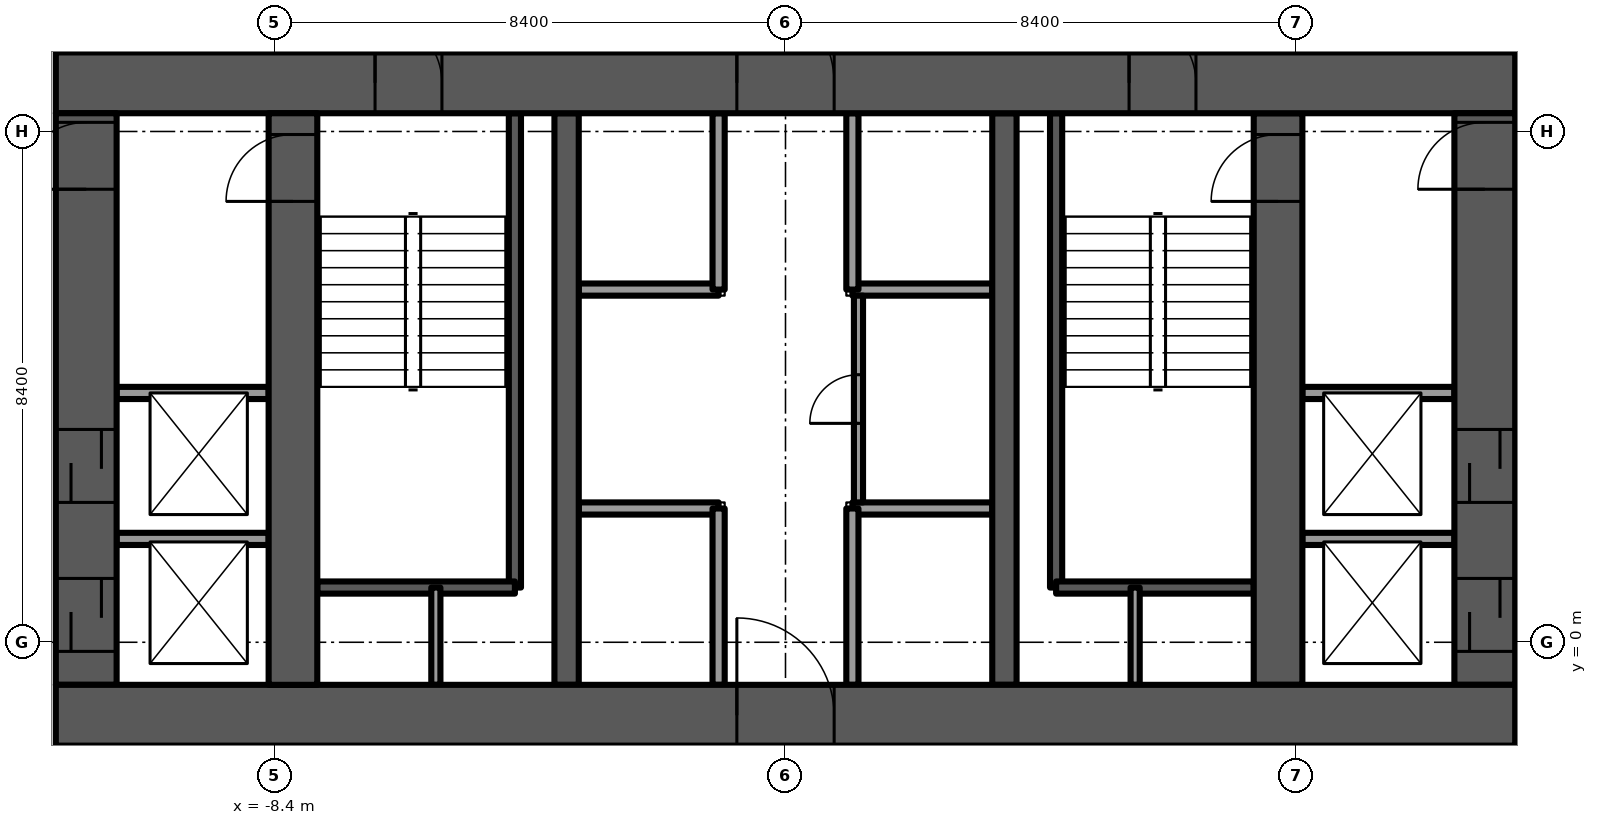
"""IFC4 building model, lengths in metres.
Left out: names, types, materials, properties, quantities, classifications, styles, units other than length and angle.
Written with IfcOpenShell. Run it as: python <this file> out.ifc"""

import sys

from ifc_helpers import new_model, si_unit, direction, frame, frame_2d, origin, place, context, subcontext, project, spatial, rectangle, extrude, element, fill, save


model = new_model("IFC4")
c1 = context("Model", 3, precision=1e-05, world=origin(), true_north=direction((0.0, 1.0)))
c2 = subcontext(c1, "Body", "Model", "MODEL_VIEW")
j1 = project(units=[si_unit("LENGTHUNIT", "METRE"), si_unit("PLANEANGLEUNIT", "RADIAN")], contexts=[c1])
p1 = place(None, origin())
s1 = spatial("IfcSite", under=j1, at=p1, CompositionType="ELEMENT")
p2 = place(p1, origin())
s2 = spatial("IfcBuilding", under=s1, at=p2, CompositionType="ELEMENT")
p3 = place(p2, frame((0.0, 0.0, 93.0)))
s3 = spatial("IfcBuildingStorey", under=s2, at=p3, CompositionType="ELEMENT", Elevation=93.0)
p4 = place(p3, frame((-12.0, -1.2, -0.3), z_axis=(0.0, 0.0, 1.0), x_axis=(1.0, 0.0, 0.0)))
e1 = element("IfcWall", 1, at=p4, inside=s3, PredefinedType="SHEAR", context=c2, shape_type="SweptSolid", body=[
    extrude(rectangle(XDim=24.0, YDim=1.0, at=frame_2d((12.0, 0.0))), origin(), (0.0, 0.0, 1.0), 3.75),
])
p5 = place(p4, frame((11.2, 0.0, 0.0)))
e2 = element("IfcOpeningElement", 2, at=p5, cuts=e1, PredefinedType="OPENING", context=c2, shape_type="SweptSolid", body=[
    extrude(rectangle(XDim=1.6, YDim=2.1, at=frame_2d((0.8, 1.05))), frame((0.0, 0.5, 0.0), z_axis=(0.0, -1.0, 0.0), x_axis=(1.0, 0.0, 0.0)), (0.0, 0.0, 1.0), 1.0),
])
p6 = place(p3, frame((-12.0, 9.2, -0.3), z_axis=(0.0, 0.0, 1.0), x_axis=(1.0, 0.0, 0.0)))
e3 = element("IfcWall", 3, at=p6, inside=s3, PredefinedType="SHEAR", context=c2, shape_type="SweptSolid", body=[
    extrude(rectangle(XDim=24.0, YDim=1.0, at=frame_2d((12.0, 0.0))), origin(), (0.0, 0.0, 1.0), 3.75),
])
p7 = place(p6, frame((11.2, 0.0, 0.0)))
e4 = element("IfcOpeningElement", 4, at=p7, cuts=e3, PredefinedType="OPENING", context=c2, shape_type="SweptSolid", body=[
    extrude(rectangle(XDim=1.6, YDim=2.1, at=frame_2d((0.8, 1.05))), frame((0.0, 0.5, 0.0), z_axis=(0.0, -1.0, 0.0), x_axis=(1.0, 0.0, 0.0)), (0.0, 0.0, 1.0), 1.0),
])
p8 = place(p6, frame((5.25, 0.0, 0.0)))
e5 = element("IfcOpeningElement", 5, at=p8, cuts=e3, PredefinedType="OPENING", context=c2, shape_type="SweptSolid", body=[
    extrude(rectangle(XDim=1.1, YDim=2.1, at=frame_2d((0.55, 1.05))), frame((0.0, 0.5, 0.0), z_axis=(0.0, -1.0, 0.0), x_axis=(1.0, 0.0, 0.0)), (0.0, 0.0, 1.0), 1.0),
])
p9 = place(p6, frame((17.65, 0.0, 0.0)))
e6 = element("IfcOpeningElement", 6, at=p9, cuts=e3, PredefinedType="OPENING", context=c2, shape_type="SweptSolid", body=[
    extrude(rectangle(XDim=1.1, YDim=2.1, at=frame_2d((0.55, 1.05))), frame((0.0, 0.5, 0.0), z_axis=(0.0, -1.0, 0.0), x_axis=(1.0, 0.0, 0.0)), (0.0, 0.0, 1.0), 1.0),
])
p10 = place(p3, frame((-8.1, -0.7, -0.3), z_axis=(0.0, 0.0, 1.0), x_axis=(0.0, 1.0, 0.0)))
e7 = element("IfcWall", 7, at=p10, inside=s3, PredefinedType="SHEAR", context=c2, shape_type="SweptSolid", body=[
    extrude(rectangle(XDim=9.4, YDim=0.8, at=frame_2d((4.7, 0.0))), origin(), (0.0, 0.0, 1.0), 3.75),
])
p11 = place(p10, frame((7.95, 0.0, 0.0)))
e8 = element("IfcOpeningElement", 8, at=p11, cuts=e7, PredefinedType="OPENING", context=c2, shape_type="SweptSolid", body=[
    extrude(rectangle(XDim=1.1, YDim=2.1, at=frame_2d((0.55, 1.05))), frame((0.0, 0.4, 0.0), z_axis=(0.0, -1.0, 0.0), x_axis=(1.0, 0.0, 0.0)), (0.0, 0.0, 1.0), 0.8),
])
p12 = place(p3, frame((8.1, -0.7, -0.3), z_axis=(0.0, 0.0, 1.0), x_axis=(0.0, 1.0, 0.0)))
e9 = element("IfcWall", 9, at=p12, inside=s3, PredefinedType="SHEAR", context=c2, shape_type="SweptSolid", body=[
    extrude(rectangle(XDim=9.4, YDim=0.8, at=frame_2d((4.7, 0.0))), origin(), (0.0, 0.0, 1.0), 3.75),
])
p13 = place(p12, frame((7.95, 0.0, 0.0)))
e10 = element("IfcOpeningElement", 10, at=p13, cuts=e9, PredefinedType="OPENING", context=c2, shape_type="SweptSolid", body=[
    extrude(rectangle(XDim=1.1, YDim=2.1, at=frame_2d((0.55, 1.05))), frame((0.0, 0.4, 0.0), z_axis=(0.0, -1.0, 0.0), x_axis=(1.0, 0.0, 0.0)), (0.0, 0.0, 1.0), 0.8),
])
for number, where, z_axis, x_axis in (
    (11, (-3.6, -0.7, -0.3), (0.0, 0.0, 1.0), (0.0, 1.0, 0.0)),
    (12, (3.6, -0.7, -0.3), (0.0, 0.0, 1.0), (0.0, 1.0, 0.0)),
):
    element("IfcWall", number, at=place(p3, frame(where, z_axis=z_axis, x_axis=x_axis)), inside=s3, PredefinedType="SHEAR", context=c2, shape_type="SweptSolid", body=[
        extrude(rectangle(XDim=9.4, YDim=0.4, at=frame_2d((4.7, 0.0))), origin(), (0.0, 0.0, 1.0), 3.75),
    ])
p14 = place(p3, frame((-11.5, -0.7, -0.3), z_axis=(0.0, 0.0, 1.0), x_axis=(0.0, 1.0, 0.0)))
e13 = element("IfcWall", 13, at=p14, inside=s3, PredefinedType="SHEAR", context=c2, shape_type="SweptSolid", body=[
    extrude(rectangle(XDim=9.4, YDim=1.0, at=frame_2d((4.7, 0.0))), origin(), (0.0, 0.0, 1.0), 3.75),
])
p15 = place(p14, frame((8.15, 0.0, 0.0)))
e14 = element("IfcOpeningElement", 14, at=p15, cuts=e13, PredefinedType="OPENING", context=c2, shape_type="SweptSolid", body=[
    extrude(rectangle(XDim=1.1, YDim=2.1, at=frame_2d((0.55, 1.05))), frame((0.0, 0.5, 0.0), z_axis=(0.0, -1.0, 0.0), x_axis=(1.0, 0.0, 0.0)), (0.0, 0.0, 1.0), 1.0),
])
p16 = place(p14, frame((0.55, 0.0, 0.0)))
e15 = element("IfcOpeningElement", 15, at=p16, cuts=e13, PredefinedType="OPENING", context=c2, shape_type="SweptSolid", body=[
    extrude(rectangle(XDim=1.2, YDim=2.1, at=frame_2d((0.6, 1.05))), frame((0.0, 0.5, 0.0), z_axis=(0.0, -1.0, 0.0), x_axis=(1.0, 0.0, 0.0)), (0.0, 0.0, 1.0), 1.0),
])
p17 = place(p14, frame((3.0, 0.0, 0.0)))
e16 = element("IfcOpeningElement", 16, at=p17, cuts=e13, PredefinedType="OPENING", context=c2, shape_type="SweptSolid", body=[
    extrude(rectangle(XDim=1.2, YDim=2.1, at=frame_2d((0.6, 1.05))), frame((0.0, 0.5, 0.0), z_axis=(0.0, -1.0, 0.0), x_axis=(1.0, 0.0, 0.0)), (0.0, 0.0, 1.0), 1.0),
])
p18 = place(p3, frame((11.5, -0.7, -0.3), z_axis=(0.0, 0.0, 1.0), x_axis=(0.0, 1.0, 0.0)))
e17 = element("IfcWall", 17, at=p18, inside=s3, PredefinedType="SHEAR", context=c2, shape_type="SweptSolid", body=[
    extrude(rectangle(XDim=9.4, YDim=1.0, at=frame_2d((4.7, 0.0))), origin(), (0.0, 0.0, 1.0), 3.75),
])
p19 = place(p18, frame((8.15, 0.0, 0.0)))
e18 = element("IfcOpeningElement", 18, at=p19, cuts=e17, PredefinedType="OPENING", context=c2, shape_type="SweptSolid", body=[
    extrude(rectangle(XDim=1.1, YDim=2.1, at=frame_2d((0.55, 1.05))), frame((0.0, 0.5, 0.0), z_axis=(0.0, -1.0, 0.0), x_axis=(1.0, 0.0, 0.0)), (0.0, 0.0, 1.0), 1.0),
])
p20 = place(p18, frame((0.55, 0.0, 0.0)))
e19 = element("IfcOpeningElement", 19, at=p20, cuts=e17, PredefinedType="OPENING", context=c2, shape_type="SweptSolid", body=[
    extrude(rectangle(XDim=1.2, YDim=2.1, at=frame_2d((0.6, 1.05))), frame((0.0, 0.5, 0.0), z_axis=(0.0, -1.0, 0.0), x_axis=(1.0, 0.0, 0.0)), (0.0, 0.0, 1.0), 1.0),
])
p21 = place(p18, frame((3.0, 0.0, 0.0)))
e20 = element("IfcOpeningElement", 20, at=p21, cuts=e17, PredefinedType="OPENING", context=c2, shape_type="SweptSolid", body=[
    extrude(rectangle(XDim=1.2, YDim=2.1, at=frame_2d((0.6, 1.05))), frame((0.0, 0.5, 0.0), z_axis=(0.0, -1.0, 0.0), x_axis=(1.0, 0.0, 0.0)), (0.0, 0.0, 1.0), 1.0),
])
for number, where, z_axis, x_axis in (
    (21, (-3.4, 2.2, 0.0), (0.0, 0.0, 1.0), (1.0, 0.0, 0.0)),
    (22, (-3.4, 5.8, 0.0), (0.0, 0.0, 1.0), (1.0, 0.0, 0.0)),
    (23, (1.1, 2.2, 0.0), (0.0, 0.0, 1.0), (1.0, 0.0, 0.0)),
    (24, (1.1, 5.8, 0.0), (0.0, 0.0, 1.0), (1.0, 0.0, 0.0)),
):
    element("IfcWall", number, at=place(p3, frame(where, z_axis=z_axis, x_axis=x_axis)), inside=s3, PredefinedType="PARTITIONING", context=c2, shape_type="SweptSolid", body=[
        extrude(rectangle(XDim=2.3, YDim=0.2, at=frame_2d((1.15, 0.0))), origin(), (0.0, 0.0, 1.0), 3.45),
    ])
for number, where, z_axis, x_axis in (
    (25, (-1.1, -0.7, 0.0), (0.0, 0.0, 1.0), (0.0, 1.0, 0.0)),
    (26, (1.1, -0.7, 0.0), (0.0, 0.0, 1.0), (0.0, 1.0, 0.0)),
    (27, (-1.1, 5.8, 0.0), (0.0, 0.0, 1.0), (0.0, 1.0, 0.0)),
    (28, (1.1, 5.8, 0.0), (0.0, 0.0, 1.0), (0.0, 1.0, 0.0)),
):
    element("IfcWall", number, at=place(p3, frame(where, z_axis=z_axis, x_axis=x_axis)), inside=s3, PredefinedType="PARTITIONING", context=c2, shape_type="SweptSolid", body=[
        extrude(rectangle(XDim=2.9, YDim=0.2, at=frame_2d((1.45, 0.0))), origin(), (0.0, 0.0, 1.0), 3.45),
    ])
p22 = place(p3, frame((-4.45, 0.9, -0.3), z_axis=(0.0, 0.0, 1.0), x_axis=(0.0, 1.0, 0.0)))
e29 = element("IfcWall", 29, at=p22, inside=s3, PredefinedType="SOLIDWALL", context=c2, shape_type="SweptSolid", body=[
    extrude(rectangle(XDim=7.8, YDim=0.2, at=frame_2d((3.9, 0.0))), origin(), (0.0, 0.0, 1.0), 3.75),
])
p23 = place(p3, frame((-7.7, 0.9, -0.3), z_axis=(0.0, 0.0, 1.0), x_axis=(1.0, 0.0, 0.0)))
e30 = element("IfcWall", 30, at=p23, inside=s3, PredefinedType="SOLIDWALL", context=c2, shape_type="SweptSolid", body=[
    extrude(rectangle(XDim=3.25, YDim=0.2, at=frame_2d((1.625, 0.0))), origin(), (0.0, 0.0, 1.0), 3.75),
])
p24 = place(p3, frame((-5.75, -0.7, 0.0), z_axis=(0.0, 0.0, 1.0), x_axis=(0.0, 1.0, 0.0)))
e31 = element("IfcWall", 31, at=p24, inside=s3, PredefinedType="PARTITIONING", context=c2, shape_type="SweptSolid", body=[
    extrude(rectangle(XDim=1.6, YDim=0.15, at=frame_2d((0.8, 0.0))), origin(), (0.0, 0.0, 1.0), 3.45),
])
p25 = place(p3, frame((4.45, 0.9, -0.3), z_axis=(0.0, 0.0, 1.0), x_axis=(0.0, 1.0, 0.0)))
e32 = element("IfcWall", 32, at=p25, inside=s3, PredefinedType="SOLIDWALL", context=c2, shape_type="SweptSolid", body=[
    extrude(rectangle(XDim=7.8, YDim=0.2, at=frame_2d((3.9, 0.0))), origin(), (0.0, 0.0, 1.0), 3.75),
])
p26 = place(p3, frame((4.45, 0.9, -0.3), z_axis=(0.0, 0.0, 1.0), x_axis=(1.0, 0.0, 0.0)))
e33 = element("IfcWall", 33, at=p26, inside=s3, PredefinedType="SOLIDWALL", context=c2, shape_type="SweptSolid", body=[
    extrude(rectangle(XDim=3.25, YDim=0.2, at=frame_2d((1.625, 0.0))), origin(), (0.0, 0.0, 1.0), 3.75),
])
p27 = place(p3, frame((5.75, -0.7, 0.0), z_axis=(0.0, 0.0, 1.0), x_axis=(0.0, 1.0, 0.0)))
e34 = element("IfcWall", 34, at=p27, inside=s3, PredefinedType="PARTITIONING", context=c2, shape_type="SweptSolid", body=[
    extrude(rectangle(XDim=1.6, YDim=0.15, at=frame_2d((0.8, 0.0))), origin(), (0.0, 0.0, 1.0), 3.45),
])
p28 = place(p3, frame((1.2, 2.3, 0.0), z_axis=(0.0, 0.0, 1.0), x_axis=(0.0, 1.0, 0.0)))
e35 = element("IfcWall", 35, at=p28, inside=s3, PredefinedType="PARTITIONING", context=c2, shape_type="SweptSolid", body=[
    extrude(rectangle(XDim=3.4, YDim=0.15, at=frame_2d((1.7, 0.0))), origin(), (0.0, 0.0, 1.0), 3.45),
])
p29 = place(p28, frame((1.3, 0.0, 0.0)))
e36 = element("IfcOpeningElement", 36, at=p29, cuts=e35, PredefinedType="OPENING", context=c2, shape_type="SweptSolid", body=[
    extrude(rectangle(XDim=0.8, YDim=2.1, at=frame_2d((0.4, 1.05))), frame((0.0, 0.075, 0.0), z_axis=(0.0, -1.0, 0.0), x_axis=(1.0, 0.0, 0.0)), (0.0, 0.0, 1.0), 0.15),
])
for number, where, z_axis, x_axis in (
    (37, (-11.0, 1.7, 0.0), (0.0, 0.0, 1.0), (1.0, 0.0, 0.0)),
    (38, (-11.0, 4.1, 0.0), (0.0, 0.0, 1.0), (1.0, 0.0, 0.0)),
    (39, (8.5, 1.7, 0.0), (0.0, 0.0, 1.0), (1.0, 0.0, 0.0)),
    (40, (8.5, 4.1, 0.0), (0.0, 0.0, 1.0), (1.0, 0.0, 0.0)),
):
    element("IfcWall", number, at=place(p3, frame(where, z_axis=z_axis, x_axis=x_axis)), inside=s3, PredefinedType="PARTITIONING", context=c2, shape_type="SweptSolid", body=[
        extrude(rectangle(XDim=2.5, YDim=0.2, at=frame_2d((1.25, 0.0))), origin(), (0.0, 0.0, 1.0), 3.45),
    ])
p30 = place(p5, origin())
e41 = element("IfcDoor", 41, at=p30, inside=s3, OperationType="DOUBLE_DOOR_SINGLE_SWING", PredefinedType="DOOR", context=c2, shape_type="SweptSolid", body=[
    extrude(rectangle(XDim=1.6, YDim=2.1, at=frame_2d((0.8, 1.05))), frame((0.0, 0.025, 0.0), z_axis=(0.0, -1.0, 0.0), x_axis=(1.0, 0.0, 0.0)), (0.0, 0.0, 1.0), 0.05),
])
fill(e2, e41)
p31 = place(p7, origin())
e42 = element("IfcDoor", 42, at=p31, inside=s3, OperationType="DOUBLE_DOOR_SINGLE_SWING", PredefinedType="DOOR", context=c2, shape_type="SweptSolid", body=[
    extrude(rectangle(XDim=1.6, YDim=2.1, at=frame_2d((0.8, 1.05))), frame((0.0, 0.025, 0.0), z_axis=(0.0, -1.0, 0.0), x_axis=(1.0, 0.0, 0.0)), (0.0, 0.0, 1.0), 0.05),
])
fill(e4, e42)
p32 = place(p8, origin())
e43 = element("IfcDoor", 43, at=p32, inside=s3, OperationType="SINGLE_SWING_LEFT", PredefinedType="DOOR", context=c2, shape_type="SweptSolid", body=[
    extrude(rectangle(XDim=1.1, YDim=2.1, at=frame_2d((0.55, 1.05))), frame((0.0, 0.025, 0.0), z_axis=(0.0, -1.0, 0.0), x_axis=(1.0, 0.0, 0.0)), (0.0, 0.0, 1.0), 0.05),
])
fill(e5, e43)
p33 = place(p11, origin())
e44 = element("IfcDoor", 44, at=p33, inside=s3, OperationType="SINGLE_SWING_RIGHT", PredefinedType="DOOR", context=c2, shape_type="SweptSolid", body=[
    extrude(rectangle(XDim=1.1, YDim=2.1, at=frame_2d((0.55, 1.05))), frame((0.0, 0.025, 0.0), z_axis=(0.0, -1.0, 0.0), x_axis=(1.0, 0.0, 0.0)), (0.0, 0.0, 1.0), 0.05),
])
fill(e8, e44)
p34 = place(p9, origin())
e45 = element("IfcDoor", 45, at=p34, inside=s3, OperationType="SINGLE_SWING_RIGHT", PredefinedType="DOOR", context=c2, shape_type="SweptSolid", body=[
    extrude(rectangle(XDim=1.1, YDim=2.1, at=frame_2d((0.55, 1.05))), frame((0.0, 0.025, 0.0), z_axis=(0.0, -1.0, 0.0), x_axis=(1.0, 0.0, 0.0)), (0.0, 0.0, 1.0), 0.05),
])
fill(e6, e45)
p35 = place(p13, origin())
e46 = element("IfcDoor", 46, at=p35, inside=s3, OperationType="SINGLE_SWING_LEFT", PredefinedType="DOOR", context=c2, shape_type="SweptSolid", body=[
    extrude(rectangle(XDim=1.1, YDim=2.1, at=frame_2d((0.55, 1.05))), frame((0.0, 0.025, 0.0), z_axis=(0.0, -1.0, 0.0), x_axis=(1.0, 0.0, 0.0)), (0.0, 0.0, 1.0), 0.05),
])
fill(e10, e46)
p36 = place(p29, origin())
e47 = element("IfcDoor", 47, at=p36, inside=s3, OperationType="SINGLE_SWING_RIGHT", PredefinedType="DOOR", context=c2, shape_type="SweptSolid", body=[
    extrude(rectangle(XDim=0.8, YDim=2.1, at=frame_2d((0.4, 1.05))), frame((0.0, 0.025, 0.0), z_axis=(0.0, -1.0, 0.0), x_axis=(1.0, 0.0, 0.0)), (0.0, 0.0, 1.0), 0.05),
])
fill(e36, e47)
p37 = place(p15, origin())
e48 = element("IfcDoor", 48, at=p37, inside=s3, OperationType="SINGLE_SWING_LEFT", PredefinedType="DOOR", context=c2, shape_type="SweptSolid", body=[
    extrude(rectangle(XDim=1.1, YDim=2.1, at=frame_2d((0.55, 1.05))), frame((0.0, 0.025, 0.0), z_axis=(0.0, -1.0, 0.0), x_axis=(1.0, 0.0, 0.0)), (0.0, 0.0, 1.0), 0.05),
])
fill(e14, e48)
p38 = place(p16, origin())
e49 = element("IfcDoor", 49, at=p38, inside=s3, OperationType="SLIDING_TO_LEFT", PredefinedType="DOOR", context=c2, shape_type="SweptSolid", body=[
    extrude(rectangle(XDim=1.2, YDim=2.1, at=frame_2d((0.6, 1.05))), frame((0.0, 0.025, 0.0), z_axis=(0.0, -1.0, 0.0), x_axis=(1.0, 0.0, 0.0)), (0.0, 0.0, 1.0), 0.05),
])
fill(e15, e49)
p39 = place(p17, origin())
e50 = element("IfcDoor", 50, at=p39, inside=s3, OperationType="SLIDING_TO_LEFT", PredefinedType="DOOR", context=c2, shape_type="SweptSolid", body=[
    extrude(rectangle(XDim=1.2, YDim=2.1, at=frame_2d((0.6, 1.05))), frame((0.0, 0.025, 0.0), z_axis=(0.0, -1.0, 0.0), x_axis=(1.0, 0.0, 0.0)), (0.0, 0.0, 1.0), 0.05),
])
fill(e16, e50)
p40 = place(p19, origin())
e51 = element("IfcDoor", 51, at=p40, inside=s3, OperationType="SINGLE_SWING_RIGHT", PredefinedType="DOOR", context=c2, shape_type="SweptSolid", body=[
    extrude(rectangle(XDim=1.1, YDim=2.1, at=frame_2d((0.55, 1.05))), frame((0.0, 0.025, 0.0), z_axis=(0.0, -1.0, 0.0), x_axis=(1.0, 0.0, 0.0)), (0.0, 0.0, 1.0), 0.05),
])
fill(e18, e51)
p41 = place(p20, origin())
e52 = element("IfcDoor", 52, at=p41, inside=s3, OperationType="SLIDING_TO_LEFT", PredefinedType="DOOR", context=c2, shape_type="SweptSolid", body=[
    extrude(rectangle(XDim=1.2, YDim=2.1, at=frame_2d((0.6, 1.05))), frame((0.0, 0.025, 0.0), z_axis=(0.0, -1.0, 0.0), x_axis=(1.0, 0.0, 0.0)), (0.0, 0.0, 1.0), 0.05),
])
fill(e19, e52)
p42 = place(p21, origin())
e53 = element("IfcDoor", 53, at=p42, inside=s3, OperationType="SLIDING_TO_LEFT", PredefinedType="DOOR", context=c2, shape_type="SweptSolid", body=[
    extrude(rectangle(XDim=1.2, YDim=2.1, at=frame_2d((0.6, 1.05))), frame((0.0, 0.025, 0.0), z_axis=(0.0, -1.0, 0.0), x_axis=(1.0, 0.0, 0.0)), (0.0, 0.0, 1.0), 0.05),
])
fill(e20, e53)
save(model, sys.argv[1])
